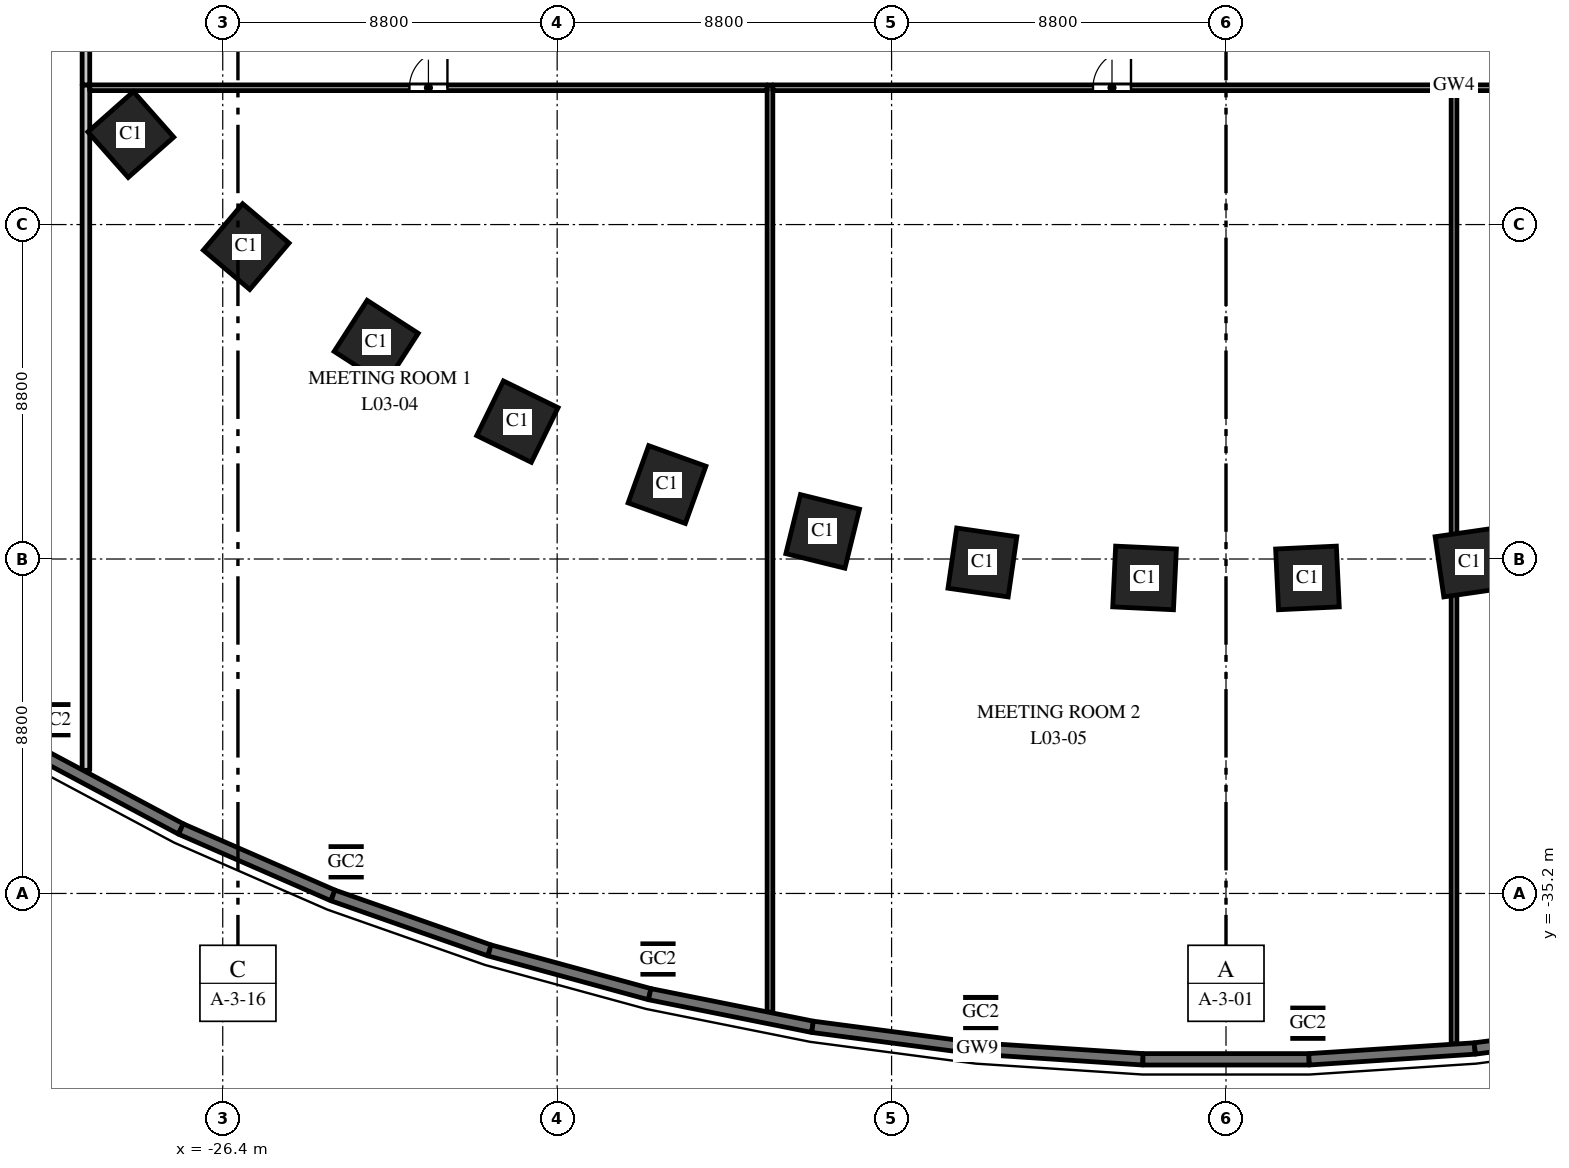
"""IFC4 building model, lengths in metres.
Left out: names, types, materials, properties, quantities, classifications, styles, units other than length and angle.
Written with IfcOpenShell. Run it as: python <this file> out.ifc"""

import sys

from ifc_helpers import new_model, si_unit, direction, frame, frame_2d, origin, origin_2d, place, context, subcontext, project, spatial, rectangle, hollow_rectangle, extrude, element, fill, save


model = new_model("IFC4")
c1 = context("Model", 3, precision=1e-05, world=origin(), true_north=direction((0.0, 1.0)))
c2 = subcontext(c1, "Body", "Model", "MODEL_VIEW")
j1 = project(units=[si_unit("LENGTHUNIT", "METRE"), si_unit("PLANEANGLEUNIT", "RADIAN")], contexts=[c1])
p1 = place(None, origin())
s1 = spatial("IfcSite", under=j1, at=p1, CompositionType="ELEMENT")
p2 = place(p1, origin())
s2 = spatial("IfcBuilding", under=s1, at=p2, CompositionType="ELEMENT")
p3 = place(p2, frame((0.0, 0.0, 19.5)))
s3 = spatial("IfcBuildingStorey", under=s2, at=p3, CompositionType="ELEMENT", Elevation=19.5)
for number, where, z_axis, x_axis in (
    (1, (-28.819, -15.23, 0.0), (0.0, 0.0, 1.0), (0.663, -0.749, 0.0)),
    (2, (-25.783, -18.18, 0.0), (0.0, 0.0, 1.0), (0.763, -0.646, 0.0)),
    (3, (-22.362, -20.7, 0.0), (0.0, 0.0, 1.0), (0.84, -0.542, 0.0)),
    (4, (-18.646, -22.785, 0.0), (0.0, 0.0, 1.0), (0.898, -0.439, 0.0)),
    (5, (-14.709, -24.441, 0.0), (0.0, 0.0, 1.0), (0.941, -0.338, 0.0)),
    (6, (-10.613, -25.674, 0.0), (0.0, 0.0, 1.0), (0.971, -0.24, 0.0)),
    (7, (-6.409, -26.491, 0.0), (0.0, 0.0, 1.0), (0.99, -0.143, 0.0)),
    (8, (-2.143, -26.898, 0.0), (0.0, 0.0, 1.0), (0.999, -0.048, 0.0)),
    (9, (2.143, -26.898, 0.0), (0.0, 0.0, 1.0), (0.999, 0.048, 0.0)),
    (10, (6.409, -26.491, 0.0), (0.0, 0.0, 1.0), (0.99, 0.143, 0.0)),
):
    element("IfcColumn", number, at=place(p3, frame(where, z_axis=z_axis, x_axis=x_axis)), inside=s3, PredefinedType="COLUMN", context=c2, shape_type="SweptSolid", body=[
        extrude(rectangle(XDim=1.6, YDim=1.6, at=origin_2d()), origin(), (0.0, 0.0, 1.0), 5.5),
    ])
for number, where, z_axis, x_axis in (
    (11, (-30.869, -30.629, 0.0), (0.0, 0.0, 1.0), (1.0, 0.0, 0.0)),
    (12, (-23.153, -34.368, 0.0), (0.0, 0.0, 1.0), (1.0, 0.0, 0.0)),
    (13, (-14.946, -36.925, 0.0), (0.0, 0.0, 1.0), (1.0, 0.0, 0.0)),
    (14, (-6.454, -38.333, 0.0), (0.0, 0.0, 1.0), (1.0, 0.0, 0.0)),
    (15, (2.155, -38.614, 0.0), (0.0, 0.0, 1.0), (1.0, 0.0, 0.0)),
):
    element("IfcColumn", number, at=place(p3, frame(where, z_axis=z_axis, x_axis=x_axis)), inside=s3, PredefinedType="COLUMN", context=c2, shape_type="SweptSolid", body=[
        extrude(hollow_rectangle(XDim=0.8, YDim=0.8, WallThickness=0.04, at=origin_2d()), origin(), (0.0, 0.0, 1.0), 5.5),
    ])
p4 = place(p3, frame((-12.0, -13.925, 0.0), z_axis=(0.0, 0.0, 1.0), x_axis=(0.0, -1.0, 0.0)))
e16 = element("IfcWall", 16, at=p4, inside=s3, PredefinedType="PARTITIONING", context=c2, shape_type="SweptSolid", body=[
    extrude(rectangle(XDim=24.4, YDim=0.15, at=frame_2d((12.2, 0.0))), origin(), (0.0, 0.0, 1.0), 4.25),
])
p5 = place(p3, frame((-30.0, -31.96, 0.0), z_axis=(0.0, 0.0, 1.0), x_axis=(0.0, 1.0, 0.0)))
e17 = element("IfcWall", 17, at=p5, inside=s3, PredefinedType="PARTITIONING", context=c2, shape_type="SweptSolid", body=[
    extrude(rectangle(XDim=18.035, YDim=0.2, at=frame_2d((9.018, 0.0))), origin(), (0.0, 0.0, 1.0), 4.25),
])
p6 = place(p3, frame((-29.9, -14.0, 0.0), z_axis=(0.0, 0.0, 1.0), x_axis=(1.0, 0.0, 0.0)))
e18 = element("IfcWall", 18, at=p6, inside=s3, PredefinedType="PARTITIONING", context=c2, shape_type="SweptSolid", body=[
    extrude(rectangle(XDim=17.825, YDim=0.15, at=frame_2d((8.913, 0.0))), origin(), (0.0, 0.0, 1.0), 4.2),
])
p7 = place(p6, frame((8.413, 0.0, 0.0)))
e19 = element("IfcOpeningElement", 19, at=p7, cuts=e18, PredefinedType="OPENING", context=c2, shape_type="SweptSolid", body=[
    extrude(rectangle(XDim=1.0, YDim=2.1, at=frame_2d((0.5, 1.05))), frame((0.0, 0.085, 0.0), z_axis=(0.0, -1.0, 0.0), x_axis=(1.0, 0.0, 0.0)), (0.0, 0.0, 1.0), 0.17),
])
p8 = place(p3, frame((6.0, -13.925, 0.0), z_axis=(0.0, 0.0, 1.0), x_axis=(0.0, -1.0, 0.0)))
e20 = element("IfcWall", 20, at=p8, inside=s3, PredefinedType="PARTITIONING", context=c2, shape_type="SweptSolid", body=[
    extrude(rectangle(XDim=25.24, YDim=0.15, at=frame_2d((12.62, 0.0))), origin(), (0.0, 0.0, 1.0), 4.3),
])
p9 = place(p3, frame((-11.925, -14.0, 0.0), z_axis=(0.0, 0.0, 1.0), x_axis=(1.0, 0.0, 0.0)))
e21 = element("IfcWall", 21, at=p9, inside=s3, PredefinedType="PARTITIONING", context=c2, shape_type="SweptSolid", body=[
    extrude(rectangle(XDim=17.85, YDim=0.15, at=frame_2d((8.925, 0.0))), origin(), (0.0, 0.0, 1.0), 4.3),
])
p10 = place(p9, frame((8.425, 0.0, 0.0)))
e22 = element("IfcOpeningElement", 22, at=p10, cuts=e21, PredefinedType="OPENING", context=c2, shape_type="SweptSolid", body=[
    extrude(rectangle(XDim=1.0, YDim=2.1, at=frame_2d((0.5, 1.05))), frame((0.0, 0.085, 0.0), z_axis=(0.0, -1.0, 0.0), x_axis=(1.0, 0.0, 0.0)), (0.0, 0.0, 1.0), 0.17),
])
p11 = place(p3, frame((6.075, -14.0, 0.0), z_axis=(0.0, 0.0, 1.0), x_axis=(1.0, 0.0, 0.0)))
e23 = element("IfcWall", 23, at=p11, inside=s3, PredefinedType="PARTITIONING", context=c2, shape_type="SweptSolid", body=[
    extrude(rectangle(XDim=17.85, YDim=0.15, at=frame_2d((8.925, 0.0))), origin(), (0.0, 0.0, 1.0), 4.3),
])
p12 = place(p3, frame((-30.0, -12.1, 0.0), z_axis=(0.0, 0.0, 1.0), x_axis=(0.0, -1.0, 0.0)))
e24 = element("IfcWall", 24, at=p12, inside=s3, PredefinedType="PARTITIONING", context=c2, shape_type="SweptSolid", body=[
    extrude(rectangle(XDim=1.826, YDim=0.2, at=frame_2d((0.913, 0.0))), origin(), (0.0, 0.0, 1.0), 4.35),
])
p13 = place(p3, frame((-31.352, -31.448, 0.0), z_axis=(0.0, 0.0, 1.0), x_axis=(0.882159305704, -0.47095112205, 0.0)))
e25 = element("IfcWall", 25, at=p13, inside=s3, PredefinedType="SOLIDWALL", context=c2, shape_type="SweptSolid", body=[
    extrude(rectangle(XDim=4.365, YDim=0.3, at=frame_2d((2.182, 0.0))), origin(), (0.0, 0.0, 1.0), 5.25),
])
p14 = place(p13, frame((1.642, 0.0, 1.0)))
e26 = element("IfcOpeningElement", 26, at=p14, cuts=e25, PredefinedType="OPENING", context=c2, shape_type="SweptSolid", body=[
    extrude(rectangle(XDim=2.4, YDim=3.0, at=frame_2d((1.2, 1.5))), frame((0.0, 0.16, 0.0), z_axis=(0.0, -1.0, 0.0), x_axis=(1.0, 0.0, 0.0)), (0.0, 0.0, 1.0), 0.32),
])
p15 = place(p3, frame((-27.501, -33.504, 0.0), z_axis=(0.0, 0.0, 1.0), x_axis=(0.916336904548, -0.400408138483, 0.0)))
e27 = element("IfcWall", 27, at=p15, inside=s3, PredefinedType="SOLIDWALL", context=c2, shape_type="SweptSolid", body=[
    extrude(rectangle(XDim=4.366, YDim=0.3, at=frame_2d((2.183, 0.0))), origin(), (0.0, 0.0, 1.0), 5.25),
])
p16 = place(p15, frame((0.983, 0.0, 1.0)))
e28 = element("IfcOpeningElement", 28, at=p16, cuts=e27, PredefinedType="OPENING", context=c2, shape_type="SweptSolid", body=[
    extrude(rectangle(XDim=2.4, YDim=3.0, at=frame_2d((1.2, 1.5))), frame((0.0, 0.16, 0.0), z_axis=(0.0, -1.0, 0.0), x_axis=(1.0, 0.0, 0.0)), (0.0, 0.0, 1.0), 0.32),
])
p17 = place(p3, frame((-23.5, -35.252, 0.0), z_axis=(0.0, 0.0, 1.0), x_axis=(0.943526738033, -0.331296384853, 0.0)))
e29 = element("IfcWall", 29, at=p17, inside=s3, PredefinedType="SOLIDWALL", context=c2, shape_type="SweptSolid", body=[
    extrude(rectangle(XDim=4.368, YDim=0.3, at=frame_2d((2.184, 0.0))), origin(), (0.0, 0.0, 1.0), 5.25),
])
p18 = place(p17, frame((0.984, 0.0, 1.0)))
e30 = element("IfcOpeningElement", 30, at=p18, cuts=e29, PredefinedType="OPENING", context=c2, shape_type="SweptSolid", body=[
    extrude(rectangle(XDim=2.4, YDim=3.0, at=frame_2d((1.2, 1.5))), frame((0.0, 0.16, 0.0), z_axis=(0.0, -1.0, 0.0), x_axis=(1.0, 0.0, 0.0)), (0.0, 0.0, 1.0), 0.32),
])
p19 = place(p3, frame((-19.379, -36.699, 0.0), z_axis=(0.0, 0.0, 1.0), x_axis=(0.964679950239, -0.263424739931, 0.0)))
e31 = element("IfcWall", 31, at=p19, inside=s3, PredefinedType="SOLIDWALL", context=c2, shape_type="SweptSolid", body=[
    extrude(rectangle(XDim=4.369, YDim=0.3, at=frame_2d((2.185, 0.0))), origin(), (0.0, 0.0, 1.0), 5.25),
])
p20 = place(p19, frame((0.985, 0.0, 1.0)))
e32 = element("IfcOpeningElement", 32, at=p20, cuts=e31, PredefinedType="OPENING", context=c2, shape_type="SweptSolid", body=[
    extrude(rectangle(XDim=2.4, YDim=3.0, at=frame_2d((1.2, 1.5))), frame((0.0, 0.16, 0.0), z_axis=(0.0, -1.0, 0.0), x_axis=(1.0, 0.0, 0.0)), (0.0, 0.0, 1.0), 0.32),
])
p21 = place(p3, frame((-15.165, -37.85, 0.0), z_axis=(0.0, 0.0, 1.0), x_axis=(0.980494629762, -0.196545875071, 0.0)))
e33 = element("IfcWall", 33, at=p21, inside=s3, PredefinedType="SOLIDWALL", context=c2, shape_type="SweptSolid", body=[
    extrude(rectangle(XDim=4.37, YDim=0.3, at=frame_2d((2.185, 0.0))), origin(), (0.0, 0.0, 1.0), 5.25),
])
p22 = place(p21, frame((0.615, 0.0, 1.0)))
e34 = element("IfcOpeningElement", 34, at=p22, cuts=e33, PredefinedType="OPENING", context=c2, shape_type="SweptSolid", body=[
    extrude(rectangle(XDim=2.4, YDim=3.0, at=frame_2d((1.2, 1.5))), frame((0.0, 0.16, 0.0), z_axis=(0.0, -1.0, 0.0), x_axis=(1.0, 0.0, 0.0)), (0.0, 0.0, 1.0), 0.32),
])
p23 = place(p3, frame((-10.88, -38.709, 0.0), z_axis=(0.0, 0.0, 1.0), x_axis=(0.991441741932, -0.130549884544, 0.0)))
e35 = element("IfcWall", 35, at=p23, inside=s3, PredefinedType="SOLIDWALL", context=c2, shape_type="SweptSolid", body=[
    extrude(rectangle(XDim=4.37, YDim=0.3, at=frame_2d((2.185, 0.0))), origin(), (0.0, 0.0, 1.0), 5.25),
])
p24 = place(p23, frame((0.985, 0.0, 1.0)))
e36 = element("IfcOpeningElement", 36, at=p24, cuts=e35, PredefinedType="OPENING", context=c2, shape_type="SweptSolid", body=[
    extrude(rectangle(XDim=2.4, YDim=3.0, at=frame_2d((1.2, 1.5))), frame((0.0, 0.16, 0.0), z_axis=(0.0, -1.0, 0.0), x_axis=(1.0, 0.0, 0.0)), (0.0, 0.0, 1.0), 0.32),
])
p25 = place(p3, frame((-6.547, -39.28, 0.0), z_axis=(0.0, 0.0, 1.0), x_axis=(0.997876871627, -0.065128711577, 0.0)))
e37 = element("IfcWall", 37, at=p25, inside=s3, PredefinedType="SOLIDWALL", context=c2, shape_type="SweptSolid", body=[
    extrude(rectangle(XDim=4.371, YDim=0.3, at=frame_2d((2.186, 0.0))), origin(), (0.0, 0.0, 1.0), 5.25),
])
p26 = place(p25, frame((0.985, 0.0, 1.0)))
e38 = element("IfcOpeningElement", 38, at=p26, cuts=e37, PredefinedType="OPENING", context=c2, shape_type="SweptSolid", body=[
    extrude(rectangle(XDim=2.4, YDim=3.0, at=frame_2d((1.2, 1.5))), frame((0.0, 0.16, 0.0), z_axis=(0.0, -1.0, 0.0), x_axis=(1.0, 0.0, 0.0)), (0.0, 0.0, 1.0), 0.32),
])
p27 = place(p3, frame((-2.186, -39.564, 0.0), z_axis=(0.0, 0.0, 1.0), x_axis=(1.0, 0.0, 0.0)))
e39 = element("IfcWall", 39, at=p27, inside=s3, PredefinedType="SOLIDWALL", context=c2, shape_type="SweptSolid", body=[
    extrude(rectangle(XDim=4.371, YDim=0.3, at=frame_2d((2.186, 0.0))), origin(), (0.0, 0.0, 1.0), 5.25),
])
p28 = place(p27, frame((0.986, 0.0, 1.0)))
e40 = element("IfcOpeningElement", 40, at=p28, cuts=e39, PredefinedType="OPENING", context=c2, shape_type="SweptSolid", body=[
    extrude(rectangle(XDim=2.4, YDim=3.0, at=frame_2d((1.2, 1.5))), frame((0.0, 0.16, 0.0), z_axis=(0.0, -1.0, 0.0), x_axis=(1.0, 0.0, 0.0)), (0.0, 0.0, 1.0), 0.32),
])
p29 = place(p3, frame((2.186, -39.564, 0.0), z_axis=(0.0, 0.0, 1.0), x_axis=(0.997876871627, 0.065128711577, 0.0)))
e41 = element("IfcWall", 41, at=p29, inside=s3, PredefinedType="SOLIDWALL", context=c2, shape_type="SweptSolid", body=[
    extrude(rectangle(XDim=4.371, YDim=0.3, at=frame_2d((2.186, 0.0))), origin(), (0.0, 0.0, 1.0), 5.25),
])
p30 = place(p29, frame((0.985, 0.0, 1.0)))
e42 = element("IfcOpeningElement", 42, at=p30, cuts=e41, PredefinedType="OPENING", context=c2, shape_type="SweptSolid", body=[
    extrude(rectangle(XDim=2.4, YDim=3.0, at=frame_2d((1.2, 1.5))), frame((0.0, 0.16, 0.0), z_axis=(0.0, -1.0, 0.0), x_axis=(1.0, 0.0, 0.0)), (0.0, 0.0, 1.0), 0.32),
])
p31 = place(p3, frame((6.547, -39.28, 0.0), z_axis=(0.0, 0.0, 1.0), x_axis=(0.991441741932, 0.130549884544, 0.0)))
e43 = element("IfcWall", 43, at=p31, inside=s3, PredefinedType="SOLIDWALL", context=c2, shape_type="SweptSolid", body=[
    extrude(rectangle(XDim=4.37, YDim=0.3, at=frame_2d((2.185, 0.0))), origin(), (0.0, 0.0, 1.0), 5.25),
])
p32 = place(p31, frame((0.985, 0.0, 1.0)))
e44 = element("IfcOpeningElement", 44, at=p32, cuts=e43, PredefinedType="OPENING", context=c2, shape_type="SweptSolid", body=[
    extrude(rectangle(XDim=2.4, YDim=3.0, at=frame_2d((1.2, 1.5))), frame((0.0, 0.16, 0.0), z_axis=(0.0, -1.0, 0.0), x_axis=(1.0, 0.0, 0.0)), (0.0, 0.0, 1.0), 0.32),
])
p33 = place(p7, origin())
e45 = element("IfcDoor", 45, at=p33, inside=s3, OperationType="SINGLE_SWING_RIGHT", PredefinedType="DOOR", context=c2, shape_type="SweptSolid", body=[
    extrude(rectangle(XDim=1.0, YDim=2.1, at=frame_2d((0.5, 1.05))), frame((0.0, 0.025, 0.0), z_axis=(0.0, -1.0, 0.0), x_axis=(1.0, 0.0, 0.0)), (0.0, 0.0, 1.0), 0.05),
])
fill(e19, e45)
p34 = place(p10, origin())
e46 = element("IfcDoor", 46, at=p34, inside=s3, OperationType="SINGLE_SWING_RIGHT", PredefinedType="DOOR", context=c2, shape_type="SweptSolid", body=[
    extrude(rectangle(XDim=1.0, YDim=2.1, at=frame_2d((0.5, 1.05))), frame((0.0, 0.025, 0.0), z_axis=(0.0, -1.0, 0.0), x_axis=(1.0, 0.0, 0.0)), (0.0, 0.0, 1.0), 0.05),
])
fill(e22, e46)
p35 = place(p14, origin())
e47 = element("IfcWindow", 47, at=p35, inside=s3, PartitioningType="SINGLE_PANEL", PredefinedType="WINDOW", context=c2, shape_type="SweptSolid", body=[
    extrude(rectangle(XDim=2.4, YDim=3.0, at=frame_2d((1.2, 1.5))), frame((0.0, 0.03, 0.0), z_axis=(0.0, -1.0, 0.0), x_axis=(1.0, 0.0, 0.0)), (0.0, 0.0, 1.0), 0.06),
])
fill(e26, e47)
p36 = place(p16, origin())
e48 = element("IfcWindow", 48, at=p36, inside=s3, PartitioningType="SINGLE_PANEL", PredefinedType="WINDOW", context=c2, shape_type="SweptSolid", body=[
    extrude(rectangle(XDim=2.4, YDim=3.0, at=frame_2d((1.2, 1.5))), frame((0.0, 0.03, 0.0), z_axis=(0.0, -1.0, 0.0), x_axis=(1.0, 0.0, 0.0)), (0.0, 0.0, 1.0), 0.06),
])
fill(e28, e48)
p37 = place(p18, origin())
e49 = element("IfcWindow", 49, at=p37, inside=s3, PartitioningType="SINGLE_PANEL", PredefinedType="WINDOW", context=c2, shape_type="SweptSolid", body=[
    extrude(rectangle(XDim=2.4, YDim=3.0, at=frame_2d((1.2, 1.5))), frame((0.0, 0.03, 0.0), z_axis=(0.0, -1.0, 0.0), x_axis=(1.0, 0.0, 0.0)), (0.0, 0.0, 1.0), 0.06),
])
fill(e30, e49)
p38 = place(p20, origin())
e50 = element("IfcWindow", 50, at=p38, inside=s3, PartitioningType="SINGLE_PANEL", PredefinedType="WINDOW", context=c2, shape_type="SweptSolid", body=[
    extrude(rectangle(XDim=2.4, YDim=3.0, at=frame_2d((1.2, 1.5))), frame((0.0, 0.03, 0.0), z_axis=(0.0, -1.0, 0.0), x_axis=(1.0, 0.0, 0.0)), (0.0, 0.0, 1.0), 0.06),
])
fill(e32, e50)
p39 = place(p22, origin())
e51 = element("IfcWindow", 51, at=p39, inside=s3, PartitioningType="SINGLE_PANEL", PredefinedType="WINDOW", context=c2, shape_type="SweptSolid", body=[
    extrude(rectangle(XDim=2.4, YDim=3.0, at=frame_2d((1.2, 1.5))), frame((0.0, 0.03, 0.0), z_axis=(0.0, -1.0, 0.0), x_axis=(1.0, 0.0, 0.0)), (0.0, 0.0, 1.0), 0.06),
])
fill(e34, e51)
p40 = place(p24, origin())
e52 = element("IfcWindow", 52, at=p40, inside=s3, PartitioningType="SINGLE_PANEL", PredefinedType="WINDOW", context=c2, shape_type="SweptSolid", body=[
    extrude(rectangle(XDim=2.4, YDim=3.0, at=frame_2d((1.2, 1.5))), frame((0.0, 0.03, 0.0), z_axis=(0.0, -1.0, 0.0), x_axis=(1.0, 0.0, 0.0)), (0.0, 0.0, 1.0), 0.06),
])
fill(e36, e52)
p41 = place(p26, origin())
e53 = element("IfcWindow", 53, at=p41, inside=s3, PartitioningType="SINGLE_PANEL", PredefinedType="WINDOW", context=c2, shape_type="SweptSolid", body=[
    extrude(rectangle(XDim=2.4, YDim=3.0, at=frame_2d((1.2, 1.5))), frame((0.0, 0.03, 0.0), z_axis=(0.0, -1.0, 0.0), x_axis=(1.0, 0.0, 0.0)), (0.0, 0.0, 1.0), 0.06),
])
fill(e38, e53)
p42 = place(p28, origin())
e54 = element("IfcWindow", 54, at=p42, inside=s3, PartitioningType="SINGLE_PANEL", PredefinedType="WINDOW", context=c2, shape_type="SweptSolid", body=[
    extrude(rectangle(XDim=2.4, YDim=3.0, at=frame_2d((1.2, 1.5))), frame((0.0, 0.03, 0.0), z_axis=(0.0, -1.0, 0.0), x_axis=(1.0, 0.0, 0.0)), (0.0, 0.0, 1.0), 0.06),
])
fill(e40, e54)
p43 = place(p30, origin())
e55 = element("IfcWindow", 55, at=p43, inside=s3, PartitioningType="SINGLE_PANEL", PredefinedType="WINDOW", context=c2, shape_type="SweptSolid", body=[
    extrude(rectangle(XDim=2.4, YDim=3.0, at=frame_2d((1.2, 1.5))), frame((0.0, 0.03, 0.0), z_axis=(0.0, -1.0, 0.0), x_axis=(1.0, 0.0, 0.0)), (0.0, 0.0, 1.0), 0.06),
])
fill(e42, e55)
save(model, sys.argv[1])
